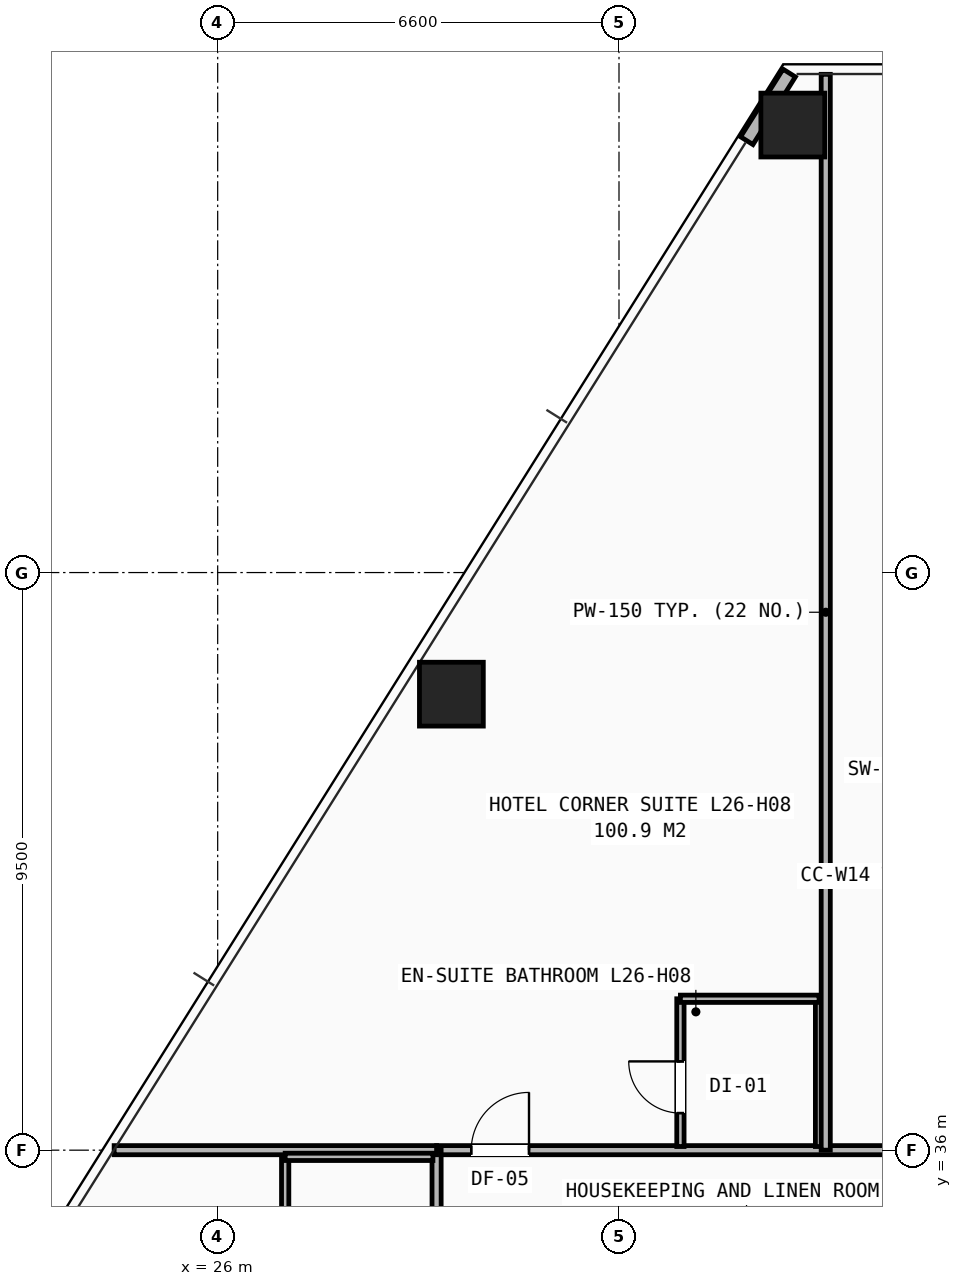
"""IFC4 building model, lengths in metres.
Left out: names, types, materials, properties, quantities, classifications, styles, units other than length and angle.
Written with IfcOpenShell. Run it as: python <this file> out.ifc"""

import sys

from ifc_helpers import new_model, si_unit, direction, frame, frame_2d, origin, origin_2d, place, context, subcontext, project, spatial, rectangle, hollow_rectangle, extrude, element, fill, save


model = new_model("IFC4")
c1 = context("Model", 3, precision=1e-05, world=origin(), true_north=direction((0.0, 1.0)))
c2 = subcontext(c1, "Body", "Model", "MODEL_VIEW")
j1 = project(units=[si_unit("LENGTHUNIT", "METRE"), si_unit("PLANEANGLEUNIT", "RADIAN")], contexts=[c1])
p1 = place(None, origin())
s1 = spatial("IfcSite", under=j1, at=p1, CompositionType="ELEMENT")
p2 = place(p1, origin())
s2 = spatial("IfcBuilding", under=s1, at=p2, CompositionType="ELEMENT")
p3 = place(p2, frame((0.0, 0.0, 92.6)))
s3 = spatial("IfcBuildingStorey", under=s2, at=p3, CompositionType="ELEMENT", Elevation=92.6)
for number, where, z_axis, x_axis in (
    (1, (35.458, 52.86, 0.0), (0.0, 0.0, 1.0), (1.0, 0.0, 0.0)),
    (2, (29.844, 43.5, 0.0), (0.0, 0.0, 1.0), (1.0, 0.0, 0.0)),
):
    element("IfcColumn", number, at=place(p3, frame(where, z_axis=z_axis, x_axis=x_axis)), inside=s3, PredefinedType="COLUMN", context=c2, shape_type="SweptSolid", body=[
        extrude(hollow_rectangle(XDim=1.05, YDim=1.05, WallThickness=0.07, at=origin_2d()), origin(), (0.0, 0.0, 1.0), 3.2),
    ])
p4 = place(p3, frame((35.399, 53.716, 0.0), z_axis=(0.0, 0.0, 1.0), x_axis=(-0.531234768042, -0.847224658059, 0.0)))
e3 = element("IfcWall", 3, at=p4, inside=s3, PredefinedType="SHEAR", context=c2, shape_type="SweptSolid", body=[
    extrude(rectangle(XDim=1.313, YDim=0.24, at=frame_2d((0.657, 0.0))), origin(), (0.0, 0.0, 1.0), 2.253),
])
p5 = place(p3, frame((29.6, 36.0, 0.0), z_axis=(0.0, 0.0, 1.0), x_axis=(1.0, 0.0, 0.0)))
e4 = element("IfcWall", 4, at=p5, inside=s3, PredefinedType="PARTITIONING", context=c2, shape_type="SweptSolid", body=[
    extrude(rectangle(XDim=9.65, YDim=0.15, at=frame_2d((4.825, 0.0))), origin(), (0.0, 0.0, 1.0), 2.503),
])
p6 = place(p5, frame((0.57, 0.0, 0.0)))
e5 = element("IfcOpeningElement", 5, at=p6, cuts=e4, PredefinedType="OPENING", context=c2, shape_type="SweptSolid", body=[
    extrude(rectangle(XDim=0.95, YDim=2.1, at=frame_2d((0.475, 1.05))), frame((0.0, 0.085, 0.0), z_axis=(0.0, -1.0, 0.0), x_axis=(1.0, 0.0, 0.0)), (0.0, 0.0, 1.0), 0.17),
])
p7 = place(p5, frame((8.02, 0.0, 0.0)))
e6 = element("IfcOpeningElement", 6, at=p7, cuts=e4, PredefinedType="OPENING", context=c2, shape_type="SweptSolid", body=[
    extrude(rectangle(XDim=0.95, YDim=2.1, at=frame_2d((0.475, 1.05))), frame((0.0, 0.085, 0.0), z_axis=(0.0, -1.0, 0.0), x_axis=(1.0, 0.0, 0.0)), (0.0, 0.0, 1.0), 0.17),
])
p8 = place(p3, frame((29.6, 14.1, 0.0), z_axis=(0.0, 0.0, 1.0), x_axis=(0.0, 1.0, 0.0)))
e7 = element("IfcWall", 7, at=p8, inside=s3, PredefinedType="PARTITIONING", context=c2, shape_type="SweptSolid", body=[
    extrude(rectangle(XDim=21.9, YDim=0.15, at=frame_2d((10.95, 0.0))), origin(), (0.0, 0.0, 1.0), 2.421),
])
p9 = place(p8, frame((0.42, 0.0, 0.0)))
e8 = element("IfcOpeningElement", 8, at=p9, cuts=e7, PredefinedType="OPENING", context=c2, shape_type="SweptSolid", body=[
    extrude(rectangle(XDim=0.95, YDim=2.1, at=frame_2d((0.475, 1.05))), frame((0.0, 0.085, 0.0), z_axis=(0.0, -1.0, 0.0), x_axis=(1.0, 0.0, 0.0)), (0.0, 0.0, 1.0), 0.17),
])
p10 = place(p8, frame((6.12, 0.0, 0.0)))
e9 = element("IfcOpeningElement", 9, at=p10, cuts=e7, PredefinedType="OPENING", context=c2, shape_type="SweptSolid", body=[
    extrude(rectangle(XDim=0.95, YDim=2.1, at=frame_2d((0.475, 1.05))), frame((0.0, 0.085, 0.0), z_axis=(0.0, -1.0, 0.0), x_axis=(1.0, 0.0, 0.0)), (0.0, 0.0, 1.0), 0.17),
])
p11 = place(p8, frame((14.12, 0.0, 0.0)))
e10 = element("IfcOpeningElement", 10, at=p11, cuts=e7, PredefinedType="OPENING", context=c2, shape_type="SweptSolid", body=[
    extrude(rectangle(XDim=0.95, YDim=2.1, at=frame_2d((0.475, 1.05))), frame((0.0, 0.085, 0.0), z_axis=(0.0, -1.0, 0.0), x_axis=(1.0, 0.0, 0.0)), (0.0, 0.0, 1.0), 0.17),
])
p12 = place(p3, frame((24.297, 36.0, 0.0), z_axis=(0.0, 0.0, 1.0), x_axis=(1.0, 0.0, 0.0)))
e11 = element("IfcWall", 11, at=p12, inside=s3, PredefinedType="PARTITIONING", context=c2, shape_type="SweptSolid", body=[
    extrude(rectangle(XDim=5.303, YDim=0.15, at=frame_2d((2.651, 0.0))), origin(), (0.0, 0.0, 1.0), 2.258),
])
p13 = place(p3, frame((27.11, 33.61, 0.0), z_axis=(0.0, 0.0, 1.0), x_axis=(0.0, 1.0, 0.0)))
e12 = element("IfcWall", 12, at=p13, inside=s3, PredefinedType="PARTITIONING", context=c2, shape_type="SweptSolid", body=[
    extrude(rectangle(XDim=2.28, YDim=0.12, at=frame_2d((1.14, 0.0))), origin(), (0.0, 0.0, 1.0), 2.97),
])
p14 = place(p3, frame((27.11, 35.89, 0.0), z_axis=(0.0, 0.0, 1.0), x_axis=(1.0, 0.0, 0.0)))
e13 = element("IfcWall", 13, at=p14, inside=s3, PredefinedType="PARTITIONING", context=c2, shape_type="SweptSolid", body=[
    extrude(rectangle(XDim=2.43, YDim=0.12, at=frame_2d((1.215, 0.0))), origin(), (0.0, 0.0, 1.0), 2.503),
])
p15 = place(p3, frame((33.61, 36.06, 0.0), z_axis=(0.0, 0.0, 1.0), x_axis=(0.0, 1.0, 0.0)))
e14 = element("IfcWall", 14, at=p15, inside=s3, PredefinedType="PARTITIONING", context=c2, shape_type="SweptSolid", body=[
    extrude(rectangle(XDim=2.43, YDim=0.12, at=frame_2d((1.215, 0.0))), origin(), (0.0, 0.0, 1.0), 2.97),
])
p16 = place(p15, frame((0.55, 0.0, 0.0)))
e15 = element("IfcOpeningElement", 15, at=p16, cuts=e14, PredefinedType="OPENING", context=c2, shape_type="SweptSolid", body=[
    extrude(rectangle(XDim=0.85, YDim=2.05, at=frame_2d((0.425, 1.025))), frame((0.0, 0.07, 0.0), z_axis=(0.0, -1.0, 0.0), x_axis=(1.0, 0.0, 0.0)), (0.0, 0.0, 1.0), 0.14),
])
p17 = place(p3, frame((35.89, 36.06, 0.0), z_axis=(0.0, 0.0, 1.0), x_axis=(0.0, 1.0, 0.0)))
e16 = element("IfcWall", 16, at=p17, inside=s3, PredefinedType="PARTITIONING", context=c2, shape_type="SweptSolid", body=[
    extrude(rectangle(XDim=2.43, YDim=0.12, at=frame_2d((1.215, 0.0))), origin(), (0.0, 0.0, 1.0), 2.97),
])
p18 = place(p3, frame((33.61, 38.49, 0.0), z_axis=(0.0, 0.0, 1.0), x_axis=(1.0, 0.0, 0.0)))
e17 = element("IfcWall", 17, at=p18, inside=s3, PredefinedType="PARTITIONING", context=c2, shape_type="SweptSolid", body=[
    extrude(rectangle(XDim=2.28, YDim=0.12, at=frame_2d((1.14, 0.0))), origin(), (0.0, 0.0, 1.0), 2.97),
])
p19 = place(p3, frame((36.0, 36.0, 0.0), z_axis=(0.0, 0.0, 1.0), x_axis=(0.0, 1.0, 0.0)))
e18 = element("IfcWall", 18, at=p19, inside=s3, PredefinedType="PARTITIONING", context=c2, shape_type="SweptSolid", body=[
    extrude(rectangle(XDim=17.694, YDim=0.15, at=frame_2d((8.847, 0.0))), origin(), (0.0, 0.0, 1.0), 2.258),
])
p20 = place(p6, origin())
e19 = element("IfcDoor", 19, at=p20, inside=s3, OperationType="SINGLE_SWING_RIGHT", PredefinedType="DOOR", context=c2, shape_type="SweptSolid", body=[
    extrude(rectangle(XDim=0.95, YDim=2.1, at=frame_2d((0.475, 1.05))), frame((0.0, 0.025, 0.0), z_axis=(0.0, -1.0, 0.0), x_axis=(1.0, 0.0, 0.0)), (0.0, 0.0, 1.0), 0.05),
])
fill(e5, e19)
p21 = place(p16, origin())
e20 = element("IfcDoor", 20, at=p21, inside=s3, OperationType="SINGLE_SWING_RIGHT", PredefinedType="DOOR", context=c2, shape_type="SweptSolid", body=[
    extrude(rectangle(XDim=0.85, YDim=2.05, at=frame_2d((0.425, 1.025))), frame((0.0, 0.025, 0.0), z_axis=(0.0, -1.0, 0.0), x_axis=(1.0, 0.0, 0.0)), (0.0, 0.0, 1.0), 0.05),
])
fill(e15, e20)
save(model, sys.argv[1])
